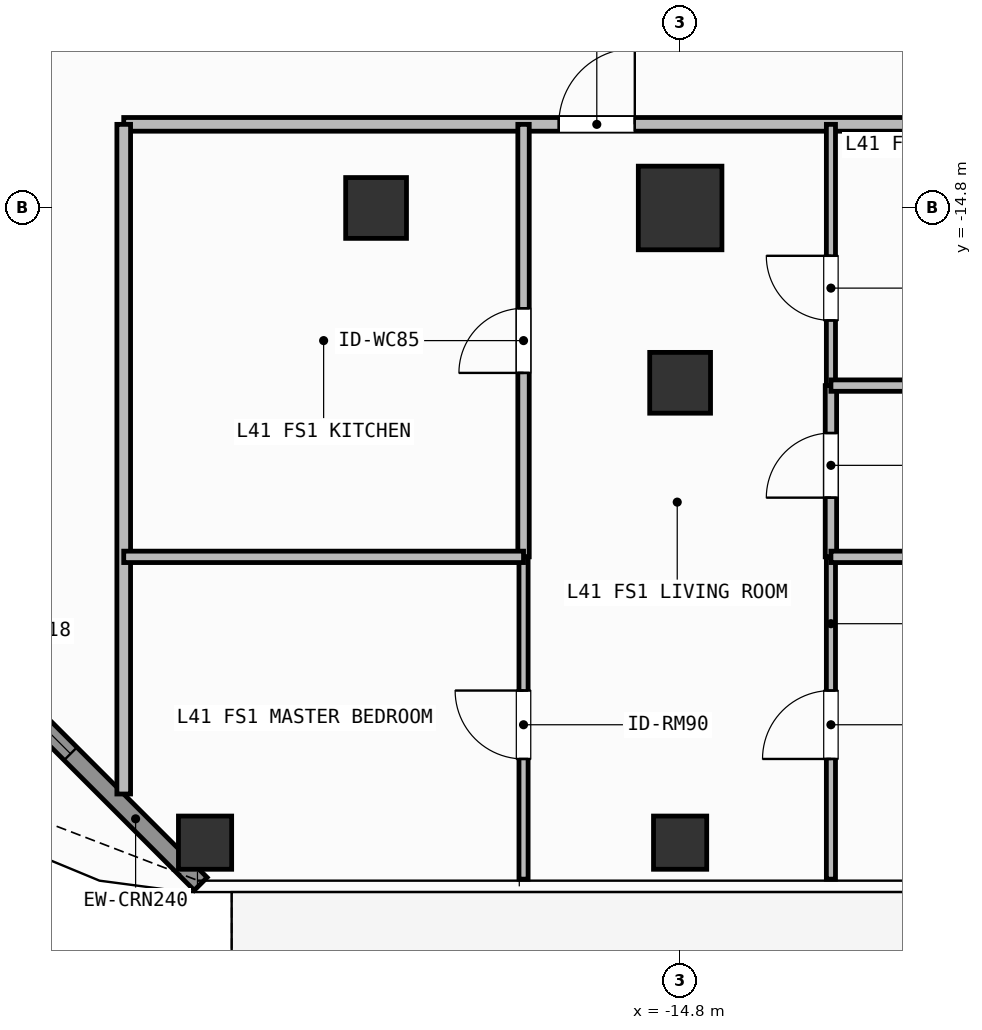
"""IFC4 building model, lengths in metres.
Left out: names, types, materials, properties, quantities, classifications, styles, units other than length and angle.
Written with IfcOpenShell. Run it as: python <this file> out.ifc"""

import sys

from ifc_helpers import new_model, si_unit, direction, frame, frame_2d, origin, origin_2d, place, context, subcontext, project, spatial, rectangle, hollow_rectangle, extrude, element, fill, save


model = new_model("IFC4")
c1 = context("Model", 3, precision=1e-05, world=origin(), true_north=direction((0.0, 1.0)))
c2 = subcontext(c1, "Body", "Model", "MODEL_VIEW")
j1 = project(units=[si_unit("LENGTHUNIT", "METRE"), si_unit("PLANEANGLEUNIT", "RADIAN")], contexts=[c1])
p1 = place(None, origin())
s1 = spatial("IfcSite", under=j1, at=p1, CompositionType="ELEMENT")
p2 = place(p1, origin())
s2 = spatial("IfcBuilding", under=s1, at=p2, CompositionType="ELEMENT")
p3 = place(p2, frame((0.0, 0.0, 168.0)))
s3 = spatial("IfcBuildingStorey", under=s2, at=p3, CompositionType="ELEMENT", Elevation=168.0)
p4 = place(p3, frame((-14.8, -14.8, 0.0), z_axis=(0.0, 0.0, 1.0), x_axis=(1.0, 0.0, 0.0)))
e1 = element("IfcColumn", 1, at=p4, inside=s3, PredefinedType="COLUMN", context=c2, shape_type="SweptSolid", body=[
    extrude(rectangle(XDim=1.1, YDim=1.1, at=origin_2d()), origin(), (0.0, 0.0, 1.0), 3.9),
])
for number, where, z_axis, x_axis in (
    (2, (-18.8, -14.8, 0.0), (0.0, 0.0, 1.0), (1.0, 0.0, 0.0)),
    (3, (-14.8, -17.1, 0.0), (0.0, 0.0, 1.0), (1.0, 0.0, 0.0)),
):
    element("IfcColumn", number, at=place(p3, frame(where, z_axis=z_axis, x_axis=x_axis)), inside=s3, PredefinedType="COLUMN", context=c2, shape_type="SweptSolid", body=[
        extrude(hollow_rectangle(XDim=0.8, YDim=0.8, WallThickness=0.036, at=origin_2d()), origin(), (0.0, 0.0, 1.0), 3.9),
    ])
for number, where, z_axis, x_axis in (
    (4, (-21.05, -23.15, 0.0), (0.0, 0.0, 1.0), (1.0, 0.0, 0.0)),
    (5, (-14.8, -23.15, 0.0), (0.0, 0.0, 1.0), (1.0, 0.0, 0.0)),
):
    element("IfcColumn", number, at=place(p3, frame(where, z_axis=z_axis, x_axis=x_axis)), inside=s3, PredefinedType="COLUMN", context=c2, shape_type="SweptSolid", body=[
        extrude(hollow_rectangle(XDim=0.7, YDim=0.7, WallThickness=0.032, at=origin_2d()), origin(), (0.0, 0.0, 1.0), 3.9),
    ])
p5 = place(p3, frame((-21.108, -23.692, 0.0), z_axis=(0.0, 0.0, 1.0), x_axis=(-0.707087534163, 0.707126027686, 0.0)))
e6 = element("IfcWall", 6, at=p5, inside=s3, PredefinedType="SOLIDWALL", context=c2, shape_type="SweptSolid", body=[
    extrude(rectangle(XDim=6.342, YDim=0.24, at=frame_2d((3.171, 0.0))), origin(), (0.0, 0.0, 1.0), 3.68),
])
p6 = place(p5, frame((2.421, 0.0, 0.8)))
e7 = element("IfcOpeningElement", 7, at=p6, cuts=e6, PredefinedType="OPENING", context=c2, shape_type="SweptSolid", body=[
    extrude(rectangle(XDim=1.5, YDim=1.85, at=frame_2d((0.75, 0.925))), frame((0.0, 0.13, 0.0), z_axis=(0.0, -1.0, 0.0), x_axis=(1.0, 0.0, 0.0)), (0.0, 0.0, 1.0), 0.26),
])
p7 = place(p3, frame((-22.12, -13.7, 0.0), z_axis=(0.0, 0.0, 1.0), x_axis=(1.0, 0.0, 0.0)))
e8 = element("IfcWall", 8, at=p7, inside=s3, PredefinedType="PARTITIONING", context=c2, shape_type="SweptSolid", body=[
    extrude(rectangle(XDim=13.345, YDim=0.18, at=frame_2d((6.673, 0.0))), origin(), (0.0, 0.0, 1.0), 3.68),
])
p8 = place(p7, frame((5.724, 0.0, 0.0)))
e9 = element("IfcOpeningElement", 9, at=p8, cuts=e8, PredefinedType="OPENING", context=c2, shape_type="SweptSolid", body=[
    extrude(rectangle(XDim=1.0, YDim=2.2, at=frame_2d((0.5, 1.1))), frame((0.0, 0.1, 0.0), z_axis=(0.0, -1.0, 0.0), x_axis=(1.0, 0.0, 0.0)), (0.0, 0.0, 1.0), 0.2),
])
p9 = place(p3, frame((-16.86, -19.39, 0.0), z_axis=(0.0, 0.0, 1.0), x_axis=(0.0, 1.0, 0.0)))
e10 = element("IfcWall", 10, at=p9, inside=s3, PredefinedType="PARTITIONING", context=c2, shape_type="SweptSolid", body=[
    extrude(rectangle(XDim=5.69, YDim=0.15, at=frame_2d((2.845, 0.0))), origin(), (0.0, 0.0, 1.0), 3.68),
])
p10 = place(p9, frame((2.42, 0.0, 0.0)))
e11 = element("IfcOpeningElement", 11, at=p10, cuts=e10, PredefinedType="OPENING", context=c2, shape_type="SweptSolid", body=[
    extrude(rectangle(XDim=0.85, YDim=2.1, at=frame_2d((0.425, 1.05))), frame((0.0, 0.085, 0.0), z_axis=(0.0, -1.0, 0.0), x_axis=(1.0, 0.0, 0.0)), (0.0, 0.0, 1.0), 0.17),
])
p11 = place(p3, frame((-16.86, -23.63, 0.0), z_axis=(0.0, 0.0, 1.0), x_axis=(0.0, 1.0, 0.0)))
e12 = element("IfcWall", 12, at=p11, inside=s3, PredefinedType="PARTITIONING", context=c2, shape_type="SweptSolid", body=[
    extrude(rectangle(XDim=4.24, YDim=0.12, at=frame_2d((2.12, 0.0))), origin(), (0.0, 0.0, 1.0), 3.68),
])
p12 = place(p11, frame((1.581, 0.0, 0.0)))
e13 = element("IfcOpeningElement", 13, at=p12, cuts=e12, PredefinedType="OPENING", context=c2, shape_type="SweptSolid", body=[
    extrude(rectangle(XDim=0.9, YDim=2.1, at=frame_2d((0.45, 1.05))), frame((0.0, 0.07, 0.0), z_axis=(0.0, -1.0, 0.0), x_axis=(1.0, 0.0, 0.0)), (0.0, 0.0, 1.0), 0.14),
])
p13 = place(p3, frame((-12.816, -19.39, 0.0), z_axis=(0.0, 0.0, 1.0), x_axis=(0.0, 1.0, 0.0)))
e14 = element("IfcWall", 14, at=p13, inside=s3, PredefinedType="PARTITIONING", context=c2, shape_type="SweptSolid", body=[
    extrude(rectangle(XDim=2.253, YDim=0.15, at=frame_2d((1.126, 0.0))), origin(), (0.0, 0.0, 1.0), 3.68),
])
p14 = place(p13, frame((0.779, 0.0, 0.0)))
e15 = element("IfcOpeningElement", 15, at=p14, cuts=e14, PredefinedType="OPENING", context=c2, shape_type="SweptSolid", body=[
    extrude(rectangle(XDim=0.85, YDim=2.1, at=frame_2d((0.425, 1.05))), frame((0.0, 0.085, 0.0), z_axis=(0.0, -1.0, 0.0), x_axis=(1.0, 0.0, 0.0)), (0.0, 0.0, 1.0), 0.17),
])
p15 = place(p3, frame((-12.816, -17.137, 0.0), z_axis=(0.0, 0.0, 1.0), x_axis=(0.0, 1.0, 0.0)))
e16 = element("IfcWall", 16, at=p15, inside=s3, PredefinedType="PARTITIONING", context=c2, shape_type="SweptSolid", body=[
    extrude(rectangle(XDim=3.437, YDim=0.12, at=frame_2d((1.719, 0.0))), origin(), (0.0, 0.0, 1.0), 3.68),
])
p16 = place(p15, frame((0.857, 0.0, 0.0)))
e17 = element("IfcOpeningElement", 17, at=p16, cuts=e16, PredefinedType="OPENING", context=c2, shape_type="SweptSolid", body=[
    extrude(rectangle(XDim=0.85, YDim=2.1, at=frame_2d((0.425, 1.05))), frame((0.0, 0.07, 0.0), z_axis=(0.0, -1.0, 0.0), x_axis=(1.0, 0.0, 0.0)), (0.0, 0.0, 1.0), 0.14),
])
p17 = place(p3, frame((-12.816, -23.63, 0.0), z_axis=(0.0, 0.0, 1.0), x_axis=(0.0, 1.0, 0.0)))
e18 = element("IfcWall", 18, at=p17, inside=s3, PredefinedType="PARTITIONING", context=c2, shape_type="SweptSolid", body=[
    extrude(rectangle(XDim=4.24, YDim=0.12, at=frame_2d((2.12, 0.0))), origin(), (0.0, 0.0, 1.0), 3.68),
])
p18 = place(p17, frame((1.581, 0.0, 0.0)))
e19 = element("IfcOpeningElement", 19, at=p18, cuts=e18, PredefinedType="OPENING", context=c2, shape_type="SweptSolid", body=[
    extrude(rectangle(XDim=0.9, YDim=2.1, at=frame_2d((0.45, 1.05))), frame((0.0, 0.07, 0.0), z_axis=(0.0, -1.0, 0.0), x_axis=(1.0, 0.0, 0.0)), (0.0, 0.0, 1.0), 0.14),
])
p19 = place(p3, frame((-22.12, -22.51, 0.0), z_axis=(0.0, 0.0, 1.0), x_axis=(0.0, 1.0, 0.0)))
e20 = element("IfcWall", 20, at=p19, inside=s3, PredefinedType="PARTITIONING", context=c2, shape_type="SweptSolid", body=[
    extrude(rectangle(XDim=8.81, YDim=0.18, at=frame_2d((4.405, 0.0))), origin(), (0.0, 0.0, 1.0), 3.68),
])
p20 = place(p3, frame((-22.12, -19.39, 0.0), z_axis=(0.0, 0.0, 1.0), x_axis=(1.0, 0.0, 0.0)))
e21 = element("IfcWall", 21, at=p20, inside=s3, PredefinedType="PARTITIONING", context=c2, shape_type="SweptSolid", body=[
    extrude(rectangle(XDim=5.26, YDim=0.15, at=frame_2d((2.63, 0.0))), origin(), (0.0, 0.0, 1.0), 3.68),
])
p21 = place(p3, frame((-12.816, -17.137, 0.0), z_axis=(0.0, 0.0, 1.0), x_axis=(1.0, 0.0, 0.0)))
e22 = element("IfcWall", 22, at=p21, inside=s3, PredefinedType="PARTITIONING", context=c2, shape_type="SweptSolid", body=[
    extrude(rectangle(XDim=4.041, YDim=0.15, at=frame_2d((2.021, 0.0))), origin(), (0.0, 0.0, 1.0), 3.082),
])
p22 = place(p3, frame((-12.816, -19.39, 0.0), z_axis=(0.0, 0.0, 1.0), x_axis=(1.0, 0.0, 0.0)))
e23 = element("IfcWall", 23, at=p22, inside=s3, PredefinedType="PARTITIONING", context=c2, shape_type="SweptSolid", body=[
    extrude(rectangle(XDim=4.041, YDim=0.15, at=frame_2d((2.021, 0.0))), origin(), (0.0, 0.0, 1.0), 3.68),
])
p23 = place(p6, origin())
e24 = element("IfcWindow", 24, at=p23, inside=s3, PartitioningType="SINGLE_PANEL", PredefinedType="WINDOW", context=c2, shape_type="SweptSolid", body=[
    extrude(rectangle(XDim=1.5, YDim=1.85, at=frame_2d((0.75, 0.925))), frame((0.0, 0.03, 0.0), z_axis=(0.0, -1.0, 0.0), x_axis=(1.0, 0.0, 0.0)), (0.0, 0.0, 1.0), 0.06),
])
fill(e7, e24)
p24 = place(p8, origin())
e25 = element("IfcDoor", 25, at=p24, inside=s3, OperationType="SINGLE_SWING_RIGHT", PredefinedType="DOOR", context=c2, shape_type="SweptSolid", body=[
    extrude(rectangle(XDim=1.0, YDim=2.2, at=frame_2d((0.5, 1.1))), frame((0.0, 0.025, 0.0), z_axis=(0.0, -1.0, 0.0), x_axis=(1.0, 0.0, 0.0)), (0.0, 0.0, 1.0), 0.05),
])
fill(e9, e25)
p25 = place(p10, origin())
e26 = element("IfcDoor", 26, at=p25, inside=s3, OperationType="SINGLE_SWING_LEFT", PredefinedType="DOOR", context=c2, shape_type="SweptSolid", body=[
    extrude(rectangle(XDim=0.85, YDim=2.1, at=frame_2d((0.425, 1.05))), frame((0.0, 0.025, 0.0), z_axis=(0.0, -1.0, 0.0), x_axis=(1.0, 0.0, 0.0)), (0.0, 0.0, 1.0), 0.05),
])
fill(e11, e26)
p26 = place(p12, origin())
e27 = element("IfcDoor", 27, at=p26, inside=s3, OperationType="SINGLE_SWING_RIGHT", PredefinedType="DOOR", context=c2, shape_type="SweptSolid", body=[
    extrude(rectangle(XDim=0.9, YDim=2.1, at=frame_2d((0.45, 1.05))), frame((0.0, 0.025, 0.0), z_axis=(0.0, -1.0, 0.0), x_axis=(1.0, 0.0, 0.0)), (0.0, 0.0, 1.0), 0.05),
])
fill(e13, e27)
p27 = place(p14, origin())
e28 = element("IfcDoor", 28, at=p27, inside=s3, OperationType="SINGLE_SWING_LEFT", PredefinedType="DOOR", context=c2, shape_type="SweptSolid", body=[
    extrude(rectangle(XDim=0.85, YDim=2.1, at=frame_2d((0.425, 1.05))), frame((0.0, 0.025, 0.0), z_axis=(0.0, -1.0, 0.0), x_axis=(1.0, 0.0, 0.0)), (0.0, 0.0, 1.0), 0.05),
])
fill(e15, e28)
p28 = place(p16, origin())
e29 = element("IfcDoor", 29, at=p28, inside=s3, OperationType="SINGLE_SWING_RIGHT", PredefinedType="DOOR", context=c2, shape_type="SweptSolid", body=[
    extrude(rectangle(XDim=0.85, YDim=2.1, at=frame_2d((0.425, 1.05))), frame((0.0, 0.025, 0.0), z_axis=(0.0, -1.0, 0.0), x_axis=(1.0, 0.0, 0.0)), (0.0, 0.0, 1.0), 0.05),
])
fill(e17, e29)
p29 = place(p18, origin())
e30 = element("IfcDoor", 30, at=p29, inside=s3, OperationType="SINGLE_SWING_LEFT", PredefinedType="DOOR", context=c2, shape_type="SweptSolid", body=[
    extrude(rectangle(XDim=0.9, YDim=2.1, at=frame_2d((0.45, 1.05))), frame((0.0, 0.025, 0.0), z_axis=(0.0, -1.0, 0.0), x_axis=(1.0, 0.0, 0.0)), (0.0, 0.0, 1.0), 0.05),
])
fill(e19, e30)
save(model, sys.argv[1])
